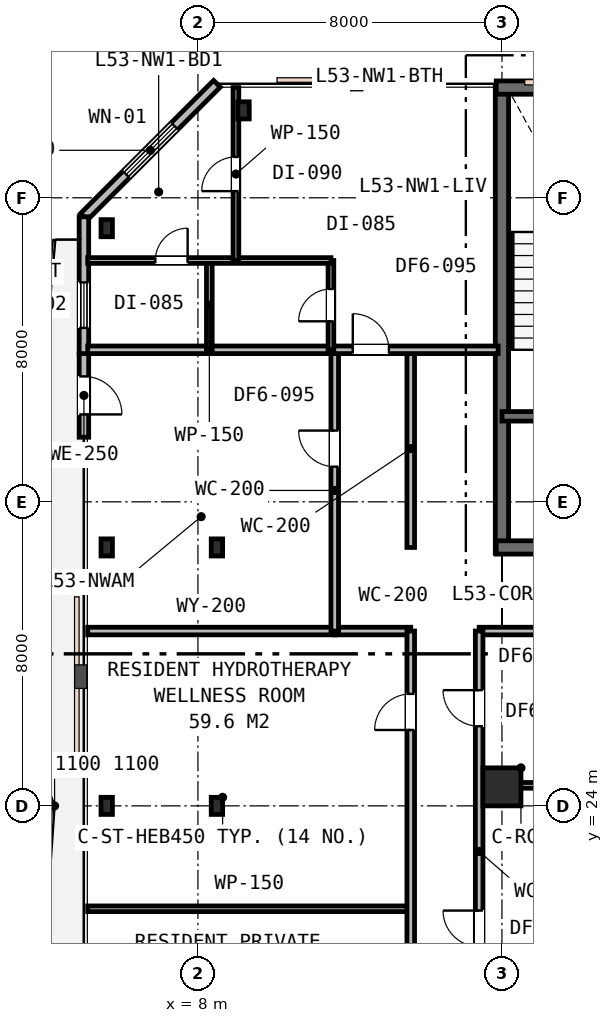
"""IFC4 building model, lengths in metres.
Left out: names, types, materials, properties, quantities, classifications, styles, units other than length and angle.
Written with IfcOpenShell. Run it as: python <this file> out.ifc"""

import sys

from ifc_helpers import new_model, si_unit, direction, frame, frame_2d, origin, origin_2d, place, context, subcontext, project, spatial, rectangle, i_section, extrude, element, fill, save


model = new_model("IFC4")
c1 = context("Model", 3, precision=1e-05, world=origin(), true_north=direction((0.0, 1.0)))
c2 = subcontext(c1, "Body", "Model", "MODEL_VIEW")
j1 = project(units=[si_unit("LENGTHUNIT", "METRE"), si_unit("PLANEANGLEUNIT", "RADIAN")], contexts=[c1])
p1 = place(None, origin())
s1 = spatial("IfcSite", under=j1, at=p1, CompositionType="ELEMENT")
p2 = place(p1, origin())
s2 = spatial("IfcBuilding", under=s1, at=p2, CompositionType="ELEMENT")
p3 = place(p2, frame((0.0, 0.0, 204.6)))
s3 = spatial("IfcBuildingStorey", under=s2, at=p3, CompositionType="ELEMENT", Elevation=204.6)
p4 = place(p3, frame((16.0, 30.65, 0.0), z_axis=(0.0, 0.0, 1.0), x_axis=(0.0, 1.0, 0.0)))
e1 = element("IfcWall", 1, at=p4, inside=s3, PredefinedType="SHEAR", context=c2, shape_type="SweptSolid", body=[
    extrude(rectangle(XDim=12.3, YDim=0.35, at=frame_2d((6.15, 0.0))), origin(), (0.0, 0.0, 1.0), 3.6),
])
p5 = place(p3, frame((15.85, 42.9, 0.0), z_axis=(0.0, 0.0, 1.0), x_axis=(1.0, 0.0, 0.0)))
e2 = element("IfcWall", 2, at=p5, inside=s3, PredefinedType="SHEAR", context=c2, shape_type="SweptSolid", body=[
    extrude(rectangle(XDim=24.3, YDim=0.35, at=frame_2d((12.15, 0.0))), origin(), (0.0, 0.0, 1.0), 3.6),
])
p6 = place(p5, frame((1.6, 0.0, 0.95)))
e3 = element("IfcOpeningElement", 3, at=p6, cuts=e2, PredefinedType="OPENING", context=c2, shape_type="SweptSolid", body=[
    extrude(rectangle(XDim=1.2, YDim=1.6, at=frame_2d((0.6, 0.8))), frame((0.0, 0.185, 0.0), z_axis=(0.0, -1.0, 0.0), x_axis=(1.0, 0.0, 0.0)), (0.0, 0.0, 1.0), 0.37),
])
p7 = place(p5, frame((16.5, 0.0, 0.95)))
e4 = element("IfcOpeningElement", 4, at=p7, cuts=e2, PredefinedType="OPENING", context=c2, shape_type="SweptSolid", body=[
    extrude(rectangle(XDim=1.2, YDim=1.6, at=frame_2d((0.6, 0.8))), frame((0.0, 0.185, 0.0), z_axis=(0.0, -1.0, 0.0), x_axis=(1.0, 0.0, 0.0)), (0.0, 0.0, 1.0), 0.37),
])
p8 = place(p5, frame((21.6, 0.0, 0.95)))
e5 = element("IfcOpeningElement", 5, at=p8, cuts=e2, PredefinedType="OPENING", context=c2, shape_type="SweptSolid", body=[
    extrude(rectangle(XDim=1.2, YDim=1.6, at=frame_2d((0.6, 0.8))), frame((0.0, 0.185, 0.0), z_axis=(0.0, -1.0, 0.0), x_axis=(1.0, 0.0, 0.0)), (0.0, 0.0, 1.0), 0.37),
])
p9 = place(p3, frame((15.85, 30.8, 0.0), z_axis=(0.0, 0.0, 1.0), x_axis=(1.0, 0.0, 0.0)))
e6 = element("IfcWall", 6, at=p9, inside=s3, PredefinedType="SHEAR", context=c2, shape_type="SweptSolid", body=[
    extrude(rectangle(XDim=11.2, YDim=0.35, at=frame_2d((5.6, 0.0))), origin(), (0.0, 0.0, 1.0), 3.6),
])
p10 = place(p9, frame((2.45, 0.0, 0.0)))
e7 = element("IfcOpeningElement", 7, at=p10, cuts=e6, PredefinedType="OPENING", context=c2, shape_type="SweptSolid", body=[
    extrude(rectangle(XDim=1.1, YDim=2.15, at=frame_2d((0.55, 1.075))), frame((0.0, 0.185, 0.0), z_axis=(0.0, -1.0, 0.0), x_axis=(1.0, 0.0, 0.0)), (0.0, 0.0, 1.0), 0.37),
])
p11 = place(p3, frame((16.0, 34.25, 0.0), z_axis=(0.0, 0.0, 1.0), x_axis=(1.0, 0.0, 0.0)))
e8 = element("IfcWall", 8, at=p11, inside=s3, PredefinedType="SHEAR", context=c2, shape_type="SweptSolid", body=[
    extrude(rectangle(XDim=6.05, YDim=0.25, at=frame_2d((3.025, 0.0))), origin(), (0.0, 0.0, 1.0), 3.6),
])
p12 = place(p11, frame((1.25, 0.0, 0.0)))
e9 = element("IfcOpeningElement", 9, at=p12, cuts=e8, PredefinedType="OPENING", context=c2, shape_type="SweptSolid", body=[
    extrude(rectangle(XDim=1.0, YDim=2.15, at=frame_2d((0.5, 1.075))), frame((0.0, 0.135, 0.0), z_axis=(0.0, -1.0, 0.0), x_axis=(1.0, 0.0, 0.0)), (0.0, 0.0, 1.0), 0.27),
])
p13 = place(p11, frame((4.2, 0.0, 0.0)))
e10 = element("IfcOpeningElement", 10, at=p13, cuts=e8, PredefinedType="OPENING", context=c2, shape_type="SweptSolid", body=[
    extrude(rectangle(XDim=1.1, YDim=2.15, at=frame_2d((0.55, 1.075))), frame((0.0, 0.135, 0.0), z_axis=(0.0, -1.0, 0.0), x_axis=(1.0, 0.0, 0.0)), (0.0, 0.0, 1.0), 0.27),
])
p14 = place(p3, frame((8.5, 24.0, 0.0), z_axis=(0.0, 0.0, 1.0), x_axis=(1.0, 0.0, 0.0)))
e11 = element("IfcColumn", 11, at=p14, inside=s3, PredefinedType="COLUMN", context=c2, shape_type="SweptSolid", body=[
    extrude(i_section(OverallWidth=0.3, OverallDepth=0.45, WebThickness=0.014, FlangeThickness=0.026, FilletRadius=0.027, at=origin_2d()), origin(), (0.0, 0.0, 1.0), 3.6),
])
p15 = place(p3, frame((16.0, 24.5, 0.0), z_axis=(0.0, 0.0, 1.0), x_axis=(1.0, 0.0, 0.0)))
e12 = element("IfcColumn", 12, at=p15, inside=s3, PredefinedType="COLUMN", context=c2, shape_type="SweptSolid", body=[
    extrude(rectangle(XDim=1.0, YDim=1.0, at=origin_2d()), origin(), (0.0, 0.0, 1.0), 3.6),
])
for number, where, z_axis, x_axis in (
    (13, (5.6, 24.0, 0.0), (0.0, 0.0, 1.0), (1.0, 0.0, 0.0)),
    (14, (5.6, 30.8, 0.0), (0.0, 0.0, 1.0), (1.0, 0.0, 0.0)),
    (15, (5.6, 39.2, 0.0), (0.0, 0.0, 1.0), (1.0, 0.0, 0.0)),
    (16, (8.5, 30.8, 0.0), (0.0, 0.0, 1.0), (1.0, 0.0, 0.0)),
    (17, (9.2, 42.3, 0.0), (0.0, 0.0, 1.0), (1.0, 0.0, 0.0)),
):
    element("IfcColumn", number, at=place(p3, frame(where, z_axis=z_axis, x_axis=x_axis)), inside=s3, PredefinedType="COLUMN", context=c2, shape_type="SweptSolid", body=[
        extrude(i_section(OverallWidth=0.3, OverallDepth=0.45, WebThickness=0.014, FlangeThickness=0.026, FilletRadius=0.027, at=origin_2d()), origin(), (0.0, 0.0, 1.0), 3.6),
    ])
p16 = place(p3, frame((8.5, 43.0, 0.0), z_axis=(0.0, 0.0, 1.0), x_axis=(-0.707106781187, -0.707106781187, 0.0)))
e18 = element("IfcWall", 18, at=p16, inside=s3, PredefinedType="STANDARD", context=c2, shape_type="SweptSolid", body=[
    extrude(rectangle(XDim=4.95, YDim=0.25, at=frame_2d((2.475, 0.0))), origin(), (0.0, 0.0, 1.0), 3.24),
])
p17 = place(p16, frame((1.575, 0.0, 0.75)))
e19 = element("IfcOpeningElement", 19, at=p17, cuts=e18, PredefinedType="OPENING", context=c2, shape_type="SweptSolid", body=[
    extrude(rectangle(XDim=1.8, YDim=1.85, at=frame_2d((0.9, 0.925))), frame((0.0, 0.135, 0.0), z_axis=(0.0, -1.0, 0.0), x_axis=(1.0, 0.0, 0.0)), (0.0, 0.0, 1.0), 0.27),
])
p18 = place(p3, frame((5.0, 35.9, 0.0), z_axis=(0.0, 0.0, 1.0), x_axis=(0.0, -1.0, 0.0)))
e20 = element("IfcWall", 20, at=p18, inside=s3, PredefinedType="STANDARD", context=c2, shape_type="SweptSolid", body=[
    extrude(rectangle(XDim=2.2, YDim=0.25, at=frame_2d((1.1, 0.0))), origin(), (0.0, 0.0, 1.0), 3.24),
])
p19 = place(p18, frame((0.6, 0.0, 0.0)))
e21 = element("IfcOpeningElement", 21, at=p19, cuts=e20, PredefinedType="OPENING", context=c2, shape_type="SweptSolid", body=[
    extrude(rectangle(XDim=1.0, YDim=2.15, at=frame_2d((0.5, 1.075))), frame((0.0, 0.135, 0.0), z_axis=(0.0, -1.0, 0.0), x_axis=(1.0, 0.0, 0.0)), (0.0, 0.0, 1.0), 0.27),
])
p20 = place(p3, frame((5.0, 39.5, 0.0), z_axis=(0.0, 0.0, 1.0), x_axis=(0.0, -1.0, 0.0)))
e22 = element("IfcWall", 22, at=p20, inside=s3, PredefinedType="STANDARD", context=c2, shape_type="SweptSolid", body=[
    extrude(rectangle(XDim=3.6, YDim=0.25, at=frame_2d((1.8, 0.0))), origin(), (0.0, 0.0, 1.0), 3.24),
])
p21 = place(p20, frame((1.725, 0.0, 0.85)))
e23 = element("IfcOpeningElement", 23, at=p21, cuts=e22, PredefinedType="OPENING", context=c2, shape_type="SweptSolid", body=[
    extrude(rectangle(XDim=1.2, YDim=1.6, at=frame_2d((0.6, 0.8))), frame((0.0, 0.135, 0.0), z_axis=(0.0, -1.0, 0.0), x_axis=(1.0, 0.0, 0.0)), (0.0, 0.0, 1.0), 0.27),
])
p22 = place(p3, frame((5.1, 28.6, 0.0), z_axis=(0.0, 0.0, 1.0), x_axis=(1.0, 0.0, 0.0)))
e24 = element("IfcWall", 24, at=p22, inside=s3, PredefinedType="PARTITIONING", context=c2, shape_type="SweptSolid", body=[
    extrude(rectangle(XDim=6.5, YDim=0.2, at=frame_2d((3.25, 0.0))), origin(), (0.0, 0.0, 1.0), 2.63),
])
p23 = place(p3, frame((11.6, 28.6, 0.0), z_axis=(0.0, 0.0, 1.0), x_axis=(1.0, 0.0, 0.0)))
e25 = element("IfcWall", 25, at=p23, inside=s3, PredefinedType="PARTITIONING", context=c2, shape_type="SweptSolid", body=[
    extrude(rectangle(XDim=2.0, YDim=0.2, at=frame_2d((1.0, 0.0))), origin(), (0.0, 0.0, 1.0), 3.24),
])
p24 = place(p3, frame((15.4, 28.6, 0.0), z_axis=(0.0, 0.0, 1.0), x_axis=(1.0, 0.0, 0.0)))
e26 = element("IfcWall", 26, at=p24, inside=s3, PredefinedType="PARTITIONING", context=c2, shape_type="SweptSolid", body=[
    extrude(rectangle(XDim=35.5, YDim=0.2, at=frame_2d((17.75, 0.0))), origin(), (0.0, 0.0, 1.0), 2.63),
])
p25 = place(p24, frame((11.525, 0.0, 0.0)))
e27 = element("IfcOpeningElement", 27, at=p25, cuts=e26, PredefinedType="OPENING", context=c2, shape_type="SweptSolid", body=[
    extrude(rectangle(XDim=0.95, YDim=2.15, at=frame_2d((0.475, 1.075))), frame((0.0, 0.11, 0.0), z_axis=(0.0, -1.0, 0.0), x_axis=(1.0, 0.0, 0.0)), (0.0, 0.0, 1.0), 0.22),
])
p26 = place(p24, frame((19.425, 0.0, 0.0)))
e28 = element("IfcOpeningElement", 28, at=p26, cuts=e26, PredefinedType="OPENING", context=c2, shape_type="SweptSolid", body=[
    extrude(rectangle(XDim=0.95, YDim=2.15, at=frame_2d((0.475, 1.075))), frame((0.0, 0.11, 0.0), z_axis=(0.0, -1.0, 0.0), x_axis=(1.0, 0.0, 0.0)), (0.0, 0.0, 1.0), 0.22),
])
p27 = place(p24, frame((26.275, 0.0, 0.0)))
e29 = element("IfcOpeningElement", 29, at=p27, cuts=e26, PredefinedType="OPENING", context=c2, shape_type="SweptSolid", body=[
    extrude(rectangle(XDim=0.95, YDim=2.15, at=frame_2d((0.475, 1.075))), frame((0.0, 0.11, 0.0), z_axis=(0.0, -1.0, 0.0), x_axis=(1.0, 0.0, 0.0)), (0.0, 0.0, 1.0), 0.22),
])
p28 = place(p3, frame((13.6, 30.8, 0.0), z_axis=(0.0, 0.0, 1.0), x_axis=(0.0, 1.0, 0.0)))
e30 = element("IfcWall", 30, at=p28, inside=s3, PredefinedType="PARTITIONING", context=c2, shape_type="SweptSolid", body=[
    extrude(rectangle(XDim=5.2, YDim=0.2, at=frame_2d((2.6, 0.0))), origin(), (0.0, 0.0, 1.0), 2.63),
])
p29 = place(p3, frame((11.6, 28.6, 0.0), z_axis=(0.0, 0.0, 1.0), x_axis=(0.0, 1.0, 0.0)))
e31 = element("IfcWall", 31, at=p29, inside=s3, PredefinedType="PARTITIONING", context=c2, shape_type="SweptSolid", body=[
    extrude(rectangle(XDim=7.4, YDim=0.2, at=frame_2d((3.7, 0.0))), origin(), (0.0, 0.0, 1.0), 2.63),
])
p30 = place(p29, frame((4.325, 0.0, 0.0)))
e32 = element("IfcOpeningElement", 32, at=p30, cuts=e31, PredefinedType="OPENING", context=c2, shape_type="SweptSolid", body=[
    extrude(rectangle(XDim=0.95, YDim=2.15, at=frame_2d((0.475, 1.075))), frame((0.0, 0.11, 0.0), z_axis=(0.0, -1.0, 0.0), x_axis=(1.0, 0.0, 0.0)), (0.0, 0.0, 1.0), 0.22),
])
p31 = place(p3, frame((5.1, 36.0, 0.0), z_axis=(0.0, 0.0, 1.0), x_axis=(1.0, 0.0, 0.0)))
e33 = element("IfcWall", 33, at=p31, inside=s3, PredefinedType="PARTITIONING", context=c2, shape_type="SweptSolid", body=[
    extrude(rectangle(XDim=10.8, YDim=0.2, at=frame_2d((5.4, 0.0))), origin(), (0.0, 0.0, 1.0), 2.95),
])
p32 = place(p31, frame((6.975, 0.0, 0.0)))
e34 = element("IfcOpeningElement", 34, at=p32, cuts=e33, PredefinedType="OPENING", context=c2, shape_type="SweptSolid", body=[
    extrude(rectangle(XDim=0.95, YDim=2.15, at=frame_2d((0.475, 1.075))), frame((0.0, 0.11, 0.0), z_axis=(0.0, -1.0, 0.0), x_axis=(1.0, 0.0, 0.0)), (0.0, 0.0, 1.0), 0.22),
])
p33 = place(p3, frame((11.5, 36.0, 0.0), z_axis=(0.0, 0.0, 1.0), x_axis=(0.0, 1.0, 0.0)))
e35 = element("IfcWall", 35, at=p33, inside=s3, PredefinedType="PARTITIONING", context=c2, shape_type="SweptSolid", body=[
    extrude(rectangle(XDim=2.35, YDim=0.15, at=frame_2d((1.175, 0.0))), origin(), (0.0, 0.0, 1.0), 3.24),
])
p34 = place(p33, frame((0.75, 0.0, 0.0)))
e36 = element("IfcOpeningElement", 36, at=p34, cuts=e35, PredefinedType="OPENING", context=c2, shape_type="SweptSolid", body=[
    extrude(rectangle(XDim=0.85, YDim=2.15, at=frame_2d((0.425, 1.075))), frame((0.0, 0.085, 0.0), z_axis=(0.0, -1.0, 0.0), x_axis=(1.0, 0.0, 0.0)), (0.0, 0.0, 1.0), 0.17),
])
p35 = place(p3, frame((8.3, 36.0, 0.0), z_axis=(0.0, 0.0, 1.0), x_axis=(0.0, 1.0, 0.0)))
e37 = element("IfcWall", 37, at=p35, inside=s3, PredefinedType="PARTITIONING", context=c2, shape_type="SweptSolid", body=[
    extrude(rectangle(XDim=2.35, YDim=0.15, at=frame_2d((1.175, 0.0))), origin(), (0.0, 0.0, 1.0), 3.24),
])
p36 = place(p3, frame((5.1, 38.35, 0.0), z_axis=(0.0, 0.0, 1.0), x_axis=(1.0, 0.0, 0.0)))
e38 = element("IfcWall", 38, at=p36, inside=s3, PredefinedType="PARTITIONING", context=c2, shape_type="SweptSolid", body=[
    extrude(rectangle(XDim=6.4, YDim=0.15, at=frame_2d((3.2, 0.0))), origin(), (0.0, 0.0, 1.0), 2.95),
])
p37 = place(p36, frame((1.78, 0.0, 0.0)))
e39 = element("IfcOpeningElement", 39, at=p37, cuts=e38, PredefinedType="OPENING", context=c2, shape_type="SweptSolid", body=[
    extrude(rectangle(XDim=0.85, YDim=2.15, at=frame_2d((0.425, 1.075))), frame((0.0, 0.085, 0.0), z_axis=(0.0, -1.0, 0.0), x_axis=(1.0, 0.0, 0.0)), (0.0, 0.0, 1.0), 0.17),
])
p38 = place(p3, frame((9.0, 38.35, 0.0), z_axis=(0.0, 0.0, 1.0), x_axis=(0.0, 1.0, 0.0)))
e40 = element("IfcWall", 40, at=p38, inside=s3, PredefinedType="PARTITIONING", context=c2, shape_type="SweptSolid", body=[
    extrude(rectangle(XDim=4.55, YDim=0.15, at=frame_2d((2.275, 0.0))), origin(), (0.0, 0.0, 1.0), 2.95),
])
p39 = place(p38, frame((1.825, 0.0, 0.0)))
e41 = element("IfcOpeningElement", 41, at=p39, cuts=e40, PredefinedType="OPENING", context=c2, shape_type="SweptSolid", body=[
    extrude(rectangle(XDim=0.9, YDim=2.15, at=frame_2d((0.45, 1.075))), frame((0.0, 0.085, 0.0), z_axis=(0.0, -1.0, 0.0), x_axis=(1.0, 0.0, 0.0)), (0.0, 0.0, 1.0), 0.17),
])
p40 = place(p3, frame((5.1, 21.292, 0.0), z_axis=(0.0, 0.0, 1.0), x_axis=(1.0, 0.0, 0.0)))
e42 = element("IfcWall", 42, at=p40, inside=s3, PredefinedType="PARTITIONING", context=c2, shape_type="SweptSolid", body=[
    extrude(rectangle(XDim=8.5, YDim=0.15, at=frame_2d((4.25, 0.0))), origin(), (0.0, 0.0, 1.0), 2.63),
])
p41 = place(p3, frame((13.6, 17.0, 0.0), z_axis=(0.0, 0.0, 1.0), x_axis=(0.0, 1.0, 0.0)))
e43 = element("IfcWall", 43, at=p41, inside=s3, PredefinedType="PARTITIONING", context=c2, shape_type="SweptSolid", body=[
    extrude(rectangle(XDim=11.6, YDim=0.2, at=frame_2d((5.8, 0.0))), origin(), (0.0, 0.0, 1.0), 2.63),
])
p42 = place(p41, frame((8.996, 0.0, 0.0)))
e44 = element("IfcOpeningElement", 44, at=p42, cuts=e43, PredefinedType="OPENING", context=c2, shape_type="SweptSolid", body=[
    extrude(rectangle(XDim=0.95, YDim=2.15, at=frame_2d((0.475, 1.075))), frame((0.0, 0.11, 0.0), z_axis=(0.0, -1.0, 0.0), x_axis=(1.0, 0.0, 0.0)), (0.0, 0.0, 1.0), 0.22),
])
p43 = place(p41, frame((2.269, 0.0, 0.0)))
e45 = element("IfcOpeningElement", 45, at=p43, cuts=e43, PredefinedType="OPENING", context=c2, shape_type="SweptSolid", body=[
    extrude(rectangle(XDim=0.95, YDim=2.15, at=frame_2d((0.475, 1.075))), frame((0.0, 0.11, 0.0), z_axis=(0.0, -1.0, 0.0), x_axis=(1.0, 0.0, 0.0)), (0.0, 0.0, 1.0), 0.22),
])
p44 = place(p3, frame((15.4, 24.54, 0.0), z_axis=(0.0, 0.0, 1.0), x_axis=(1.0, 0.0, 0.0)))
e46 = element("IfcWall", 46, at=p44, inside=s3, PredefinedType="PARTITIONING", context=c2, shape_type="SweptSolid", body=[
    extrude(rectangle(XDim=8.5, YDim=0.15, at=frame_2d((4.25, 0.0))), origin(), (0.0, 0.0, 1.0), 2.63),
])
p45 = place(p3, frame((15.4, 17.0, 0.0), z_axis=(0.0, 0.0, 1.0), x_axis=(0.0, 1.0, 0.0)))
e47 = element("IfcWall", 47, at=p45, inside=s3, PredefinedType="PARTITIONING", context=c2, shape_type="SweptSolid", body=[
    extrude(rectangle(XDim=11.6, YDim=0.2, at=frame_2d((5.8, 0.0))), origin(), (0.0, 0.0, 1.0), 2.63),
])
p46 = place(p45, frame((9.095, 0.0, 0.0)))
e48 = element("IfcOpeningElement", 48, at=p46, cuts=e47, PredefinedType="OPENING", context=c2, shape_type="SweptSolid", body=[
    extrude(rectangle(XDim=0.95, YDim=2.15, at=frame_2d((0.475, 1.075))), frame((0.0, 0.11, 0.0), z_axis=(0.0, -1.0, 0.0), x_axis=(1.0, 0.0, 0.0)), (0.0, 0.0, 1.0), 0.22),
])
p47 = place(p45, frame((3.295, 0.0, 0.0)))
e49 = element("IfcOpeningElement", 49, at=p47, cuts=e47, PredefinedType="OPENING", context=c2, shape_type="SweptSolid", body=[
    extrude(rectangle(XDim=0.95, YDim=2.15, at=frame_2d((0.475, 1.075))), frame((0.0, 0.11, 0.0), z_axis=(0.0, -1.0, 0.0), x_axis=(1.0, 0.0, 0.0)), (0.0, 0.0, 1.0), 0.22),
])
p48 = place(p17, origin())
e50 = element("IfcWindow", 50, at=p48, inside=s3, PartitioningType="SINGLE_PANEL", PredefinedType="WINDOW", context=c2, shape_type="SweptSolid", body=[
    extrude(rectangle(XDim=1.8, YDim=1.85, at=frame_2d((0.9, 0.925))), frame((0.0, 0.03, 0.0), z_axis=(0.0, -1.0, 0.0), x_axis=(1.0, 0.0, 0.0)), (0.0, 0.0, 1.0), 0.06),
])
fill(e19, e50)
p49 = place(p19, origin())
e51 = element("IfcDoor", 51, at=p49, inside=s3, OperationType="SINGLE_SWING_RIGHT", PredefinedType="DOOR", context=c2, shape_type="SweptSolid", body=[
    extrude(rectangle(XDim=1.0, YDim=2.15, at=frame_2d((0.5, 1.075))), frame((0.0, 0.025, 0.0), z_axis=(0.0, -1.0, 0.0), x_axis=(1.0, 0.0, 0.0)), (0.0, 0.0, 1.0), 0.05),
])
fill(e21, e51)
p50 = place(p21, origin())
e52 = element("IfcWindow", 52, at=p50, inside=s3, PartitioningType="SINGLE_PANEL", PredefinedType="WINDOW", context=c2, shape_type="SweptSolid", body=[
    extrude(rectangle(XDim=1.2, YDim=1.6, at=frame_2d((0.6, 0.8))), frame((0.0, 0.03, 0.0), z_axis=(0.0, -1.0, 0.0), x_axis=(1.0, 0.0, 0.0)), (0.0, 0.0, 1.0), 0.06),
])
fill(e23, e52)
p51 = place(p30, origin())
e53 = element("IfcDoor", 53, at=p51, inside=s3, OperationType="SINGLE_SWING_RIGHT", PredefinedType="DOOR", context=c2, shape_type="SweptSolid", body=[
    extrude(rectangle(XDim=0.95, YDim=2.15, at=frame_2d((0.475, 1.075))), frame((0.0, 0.025, 0.0), z_axis=(0.0, -1.0, 0.0), x_axis=(1.0, 0.0, 0.0)), (0.0, 0.0, 1.0), 0.05),
])
fill(e32, e53)
p52 = place(p32, origin())
e54 = element("IfcDoor", 54, at=p52, inside=s3, OperationType="SINGLE_SWING_LEFT", PredefinedType="DOOR", context=c2, shape_type="SweptSolid", body=[
    extrude(rectangle(XDim=0.95, YDim=2.15, at=frame_2d((0.475, 1.075))), frame((0.0, 0.025, 0.0), z_axis=(0.0, -1.0, 0.0), x_axis=(1.0, 0.0, 0.0)), (0.0, 0.0, 1.0), 0.05),
])
fill(e34, e54)
p53 = place(p34, origin())
e55 = element("IfcDoor", 55, at=p53, inside=s3, OperationType="SINGLE_SWING_LEFT", PredefinedType="DOOR", context=c2, shape_type="SweptSolid", body=[
    extrude(rectangle(XDim=0.85, YDim=2.15, at=frame_2d((0.425, 1.075))), frame((0.0, 0.025, 0.0), z_axis=(0.0, -1.0, 0.0), x_axis=(1.0, 0.0, 0.0)), (0.0, 0.0, 1.0), 0.05),
])
fill(e36, e55)
p54 = place(p37, origin())
e56 = element("IfcDoor", 56, at=p54, inside=s3, OperationType="SINGLE_SWING_RIGHT", PredefinedType="DOOR", context=c2, shape_type="SweptSolid", body=[
    extrude(rectangle(XDim=0.85, YDim=2.15, at=frame_2d((0.425, 1.075))), frame((0.0, 0.025, 0.0), z_axis=(0.0, -1.0, 0.0), x_axis=(1.0, 0.0, 0.0)), (0.0, 0.0, 1.0), 0.05),
])
fill(e39, e56)
p55 = place(p39, origin())
e57 = element("IfcDoor", 57, at=p55, inside=s3, OperationType="SINGLE_SWING_LEFT", PredefinedType="DOOR", context=c2, shape_type="SweptSolid", body=[
    extrude(rectangle(XDim=0.9, YDim=2.15, at=frame_2d((0.45, 1.075))), frame((0.0, 0.025, 0.0), z_axis=(0.0, -1.0, 0.0), x_axis=(1.0, 0.0, 0.0)), (0.0, 0.0, 1.0), 0.05),
])
fill(e41, e57)
p56 = place(p42, origin())
e58 = element("IfcDoor", 58, at=p56, inside=s3, OperationType="SINGLE_SWING_LEFT", PredefinedType="DOOR", context=c2, shape_type="SweptSolid", body=[
    extrude(rectangle(XDim=0.95, YDim=2.15, at=frame_2d((0.475, 1.075))), frame((0.0, 0.025, 0.0), z_axis=(0.0, -1.0, 0.0), x_axis=(1.0, 0.0, 0.0)), (0.0, 0.0, 1.0), 0.05),
])
fill(e44, e58)
p57 = place(p46, origin())
e59 = element("IfcDoor", 59, at=p57, inside=s3, OperationType="SINGLE_SWING_RIGHT", PredefinedType="DOOR", context=c2, shape_type="SweptSolid", body=[
    extrude(rectangle(XDim=0.95, YDim=2.15, at=frame_2d((0.475, 1.075))), frame((0.0, 0.025, 0.0), z_axis=(0.0, -1.0, 0.0), x_axis=(1.0, 0.0, 0.0)), (0.0, 0.0, 1.0), 0.05),
])
fill(e48, e59)
p58 = place(p47, origin())
e60 = element("IfcDoor", 60, at=p58, inside=s3, OperationType="SINGLE_SWING_RIGHT", PredefinedType="DOOR", context=c2, shape_type="SweptSolid", body=[
    extrude(rectangle(XDim=0.95, YDim=2.15, at=frame_2d((0.475, 1.075))), frame((0.0, 0.025, 0.0), z_axis=(0.0, -1.0, 0.0), x_axis=(1.0, 0.0, 0.0)), (0.0, 0.0, 1.0), 0.05),
])
fill(e49, e60)
save(model, sys.argv[1])
